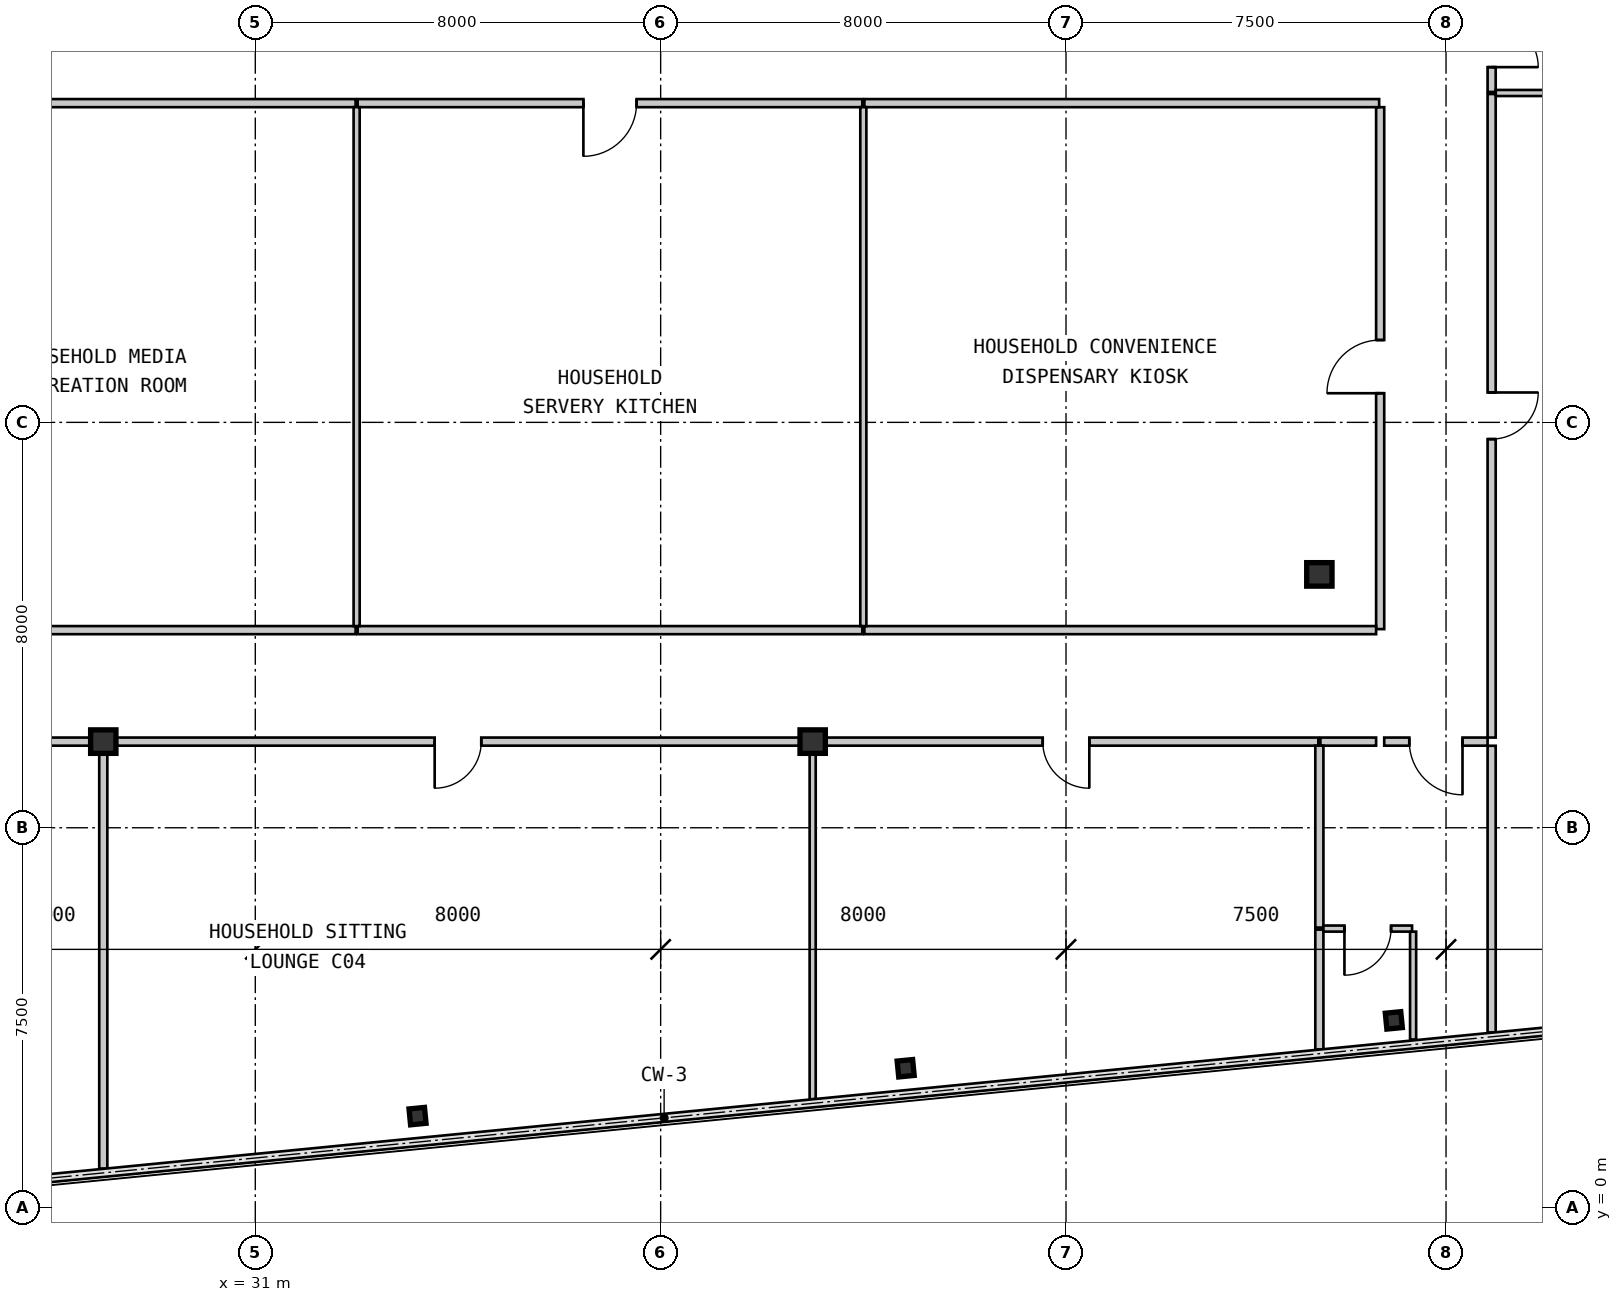
"""IFC4 building model, lengths in metres.
Left out: names, types, materials, properties, quantities, classifications, styles, units other than length and angle.
Written with IfcOpenShell. Run it as: python <this file> out.ifc"""

import sys

from ifc_helpers import new_model, si_unit, direction, frame, frame_2d, origin, origin_2d, place, context, subcontext, project, spatial, rectangle, i_section, extrude, source, transform, mapped, element, fill, save


model = new_model("IFC4")
c1 = context("Model", 3, precision=1e-05, world=origin(), true_north=direction((0.0, 1.0)))
c2 = subcontext(c1, "Body", "Model", "MODEL_VIEW")
j1 = project(units=[si_unit("LENGTHUNIT", "METRE"), si_unit("PLANEANGLEUNIT", "RADIAN")], contexts=[c1])
p1 = place(None, origin())
s1 = spatial("IfcSite", under=j1, at=p1, CompositionType="ELEMENT")
p2 = place(p1, origin())
s2 = spatial("IfcBuilding", under=s1, at=p2, CompositionType="ELEMENT")
p3 = place(p2, frame((0.0, 0.0, 80.85)))
s3 = spatial("IfcBuildingStorey", under=s2, at=p3, CompositionType="ELEMENT", Elevation=80.85)
m1 = source(origin(), c2, "Body", "SweptSolid", [
    extrude(i_section(OverallWidth=0.5, OverallDepth=0.464, WebThickness=0.022, FlangeThickness=0.034, at=origin_2d()), origin(), (0.0, 0.0, 1.0), 3.15),
])
for number, where, z_axis, x_axis in (
    (1, (28.0, 9.2, 0.0), (0.0, 0.0, 1.0), (1.0, 0.0, 0.0)),
    (2, (42.0, 9.2, 0.0), (0.0, 0.0, 1.0), (1.0, 0.0, 0.0)),
    (3, (52.0, 12.5, 0.0), (0.0, 0.0, 1.0), (1.0, 0.0, 0.0)),
):
    element("IfcColumn", number, at=place(p3, frame(where, z_axis=z_axis, x_axis=x_axis)), inside=s3, PredefinedType="COLUMN", context=c2, shape_type="MappedRepresentation", body=[
        mapped(m1, transform((0.0, 0.0, 0.0), scale=1.0)),
    ])
m2 = source(origin(), c2, "Body", "SweptSolid", [
    extrude(i_section(OverallWidth=0.307, OverallDepth=0.315, WebThickness=0.012, FlangeThickness=0.019, at=origin_2d()), origin(), (0.0, 0.0, 1.0), 3.15),
])
for number, where, z_axis, x_axis in (
    (4, (34.202, 1.809, 0.0), (0.0, 0.0, 1.0), (0.995, 0.098, 0.0)),
    (5, (43.835, 2.754, 0.0), (0.0, 0.0, 1.0), (0.995, 0.098, 0.0)),
    (6, (53.469, 3.698, 0.0), (0.0, 0.0, 1.0), (0.995, 0.098, 0.0)),
):
    element("IfcColumn", number, at=place(p3, frame(where, z_axis=z_axis, x_axis=x_axis)), inside=s3, PredefinedType="COLUMN", context=c2, shape_type="MappedRepresentation", body=[
        mapped(m2, transform((0.0, 0.0, 0.0), scale=1.0)),
    ])
m3 = source(origin(), c2, "Body", "SweptSolid", [
    extrude(rectangle(XDim=16.159, YDim=0.16, at=frame_2d((8.08, 0.0))), origin(), (0.0, 0.0, 1.0), 2.93),
])
p4 = place(p3, frame((32.98, 21.8, 0.0), z_axis=(0.0, 0.0, 1.0), x_axis=(-1.0, 0.0, 0.0)))
e7 = element("IfcWall", 7, at=p4, inside=s3, PredefinedType="PARTITIONING", context=c2, shape_type="MappedRepresentation", body=[
    mapped(m3, transform((0.0, 0.0, 0.0), scale=1.0)),
])
m4 = source(origin(), c2, "Body", "SweptSolid", [
    extrude(rectangle(XDim=0.92, YDim=2.1, at=frame_2d((0.46, 1.05))), frame((0.0, 0.09, 0.0), z_axis=(0.0, -1.0, 0.0), x_axis=(1.0, 0.0, 0.0)), (0.0, 0.0, 1.0), 0.18),
])
p5 = place(p4, frame((7.62, 0.0, 0.0)))
e8 = element("IfcOpeningElement", 8, at=p5, cuts=e7, PredefinedType="OPENING", context=c2, shape_type="MappedRepresentation", body=[
    mapped(m4, transform((0.0, 0.0, 0.0), scale=1.0)),
])
m5 = source(origin(), c2, "Body", "SweptSolid", [
    extrude(rectangle(XDim=9.959, YDim=0.16, at=frame_2d((4.98, 0.0))), origin(), (0.0, 0.0, 1.0), 2.93),
])
p6 = place(p3, frame((42.98, 21.8, 0.0), z_axis=(0.0, 0.0, 1.0), x_axis=(-1.0, 0.0, 0.0)))
e9 = element("IfcWall", 9, at=p6, inside=s3, PredefinedType="PARTITIONING", context=c2, shape_type="MappedRepresentation", body=[
    mapped(m5, transform((0.0, 0.0, 0.0), scale=1.0)),
])
m6 = source(origin(), c2, "Body", "SweptSolid", [
    extrude(rectangle(XDim=1.05, YDim=2.1, at=frame_2d((0.525, 1.05))), frame((0.0, 0.09, 0.0), z_axis=(0.0, -1.0, 0.0), x_axis=(1.0, 0.0, 0.0)), (0.0, 0.0, 1.0), 0.18),
])
p7 = place(p6, frame((4.455, 0.0, 0.0)))
e10 = element("IfcOpeningElement", 10, at=p7, cuts=e9, PredefinedType="OPENING", context=c2, shape_type="MappedRepresentation", body=[
    mapped(m6, transform((0.0, 0.0, 0.0), scale=1.0)),
])
m7 = source(origin(), c2, "Body", "SweptSolid", [
    extrude(rectangle(XDim=10.3, YDim=0.16, at=frame_2d((5.15, 0.0))), origin(), (0.0, 0.0, 1.0), 2.93),
])
p8 = place(p3, frame((53.2, 11.42, 0.0), z_axis=(0.0, 0.0, 1.0), x_axis=(0.0, 1.0, 0.0)))
e11 = element("IfcWall", 11, at=p8, inside=s3, PredefinedType="PARTITIONING", context=c2, shape_type="MappedRepresentation", body=[
    mapped(m7, transform((0.0, 0.0, 0.0), scale=1.0)),
])
p9 = place(p8, frame((4.655, 0.0, 0.0)))
e12 = element("IfcOpeningElement", 12, at=p9, cuts=e11, PredefinedType="OPENING", context=c2, shape_type="MappedRepresentation", body=[
    mapped(m6, transform((0.0, 0.0, 0.0), scale=1.0)),
])
m8 = source(origin(), c2, "Body", "SweptSolid", [
    extrude(rectangle(XDim=10.159, YDim=0.16, at=frame_2d((5.08, 0.0))), origin(), (0.0, 0.0, 1.0), 2.93),
])
p10 = place(p3, frame((53.18, 21.8, 0.0), z_axis=(0.0, 0.0, 1.0), x_axis=(-1.0, 0.0, 0.0)))
e13 = element("IfcWall", 13, at=p10, inside=s3, PredefinedType="PARTITIONING", context=c2, shape_type="MappedRepresentation", body=[
    mapped(m8, transform((0.0, 0.0, 0.0), scale=1.0)),
])
m9 = source(origin(), c2, "Body", "SweptSolid", [
    extrude(rectangle(XDim=2.04, YDim=0.16, at=frame_2d((1.02, 0.0))), origin(), (0.0, 0.0, 1.0), 2.93),
])
p11 = place(p3, frame((55.32, 9.2, 0.0), z_axis=(0.0, 0.0, 1.0), x_axis=(-1.0, 0.0, 0.0)))
e14 = element("IfcWall", 14, at=p11, inside=s3, PredefinedType="PARTITIONING", context=c2, shape_type="MappedRepresentation", body=[
    mapped(m9, transform((0.0, 0.0, 0.0), scale=1.0)),
])
p12 = place(p11, frame((0.495, 0.0, 0.0)))
e15 = element("IfcOpeningElement", 15, at=p12, cuts=e14, PredefinedType="OPENING", context=c2, shape_type="MappedRepresentation", body=[
    mapped(m6, transform((0.0, 0.0, 0.0), scale=1.0)),
])
m10 = source(origin(), c2, "Body", "SweptSolid", [
    extrude(rectangle(XDim=12.7, YDim=0.16, at=frame_2d((6.35, 0.0))), origin(), (0.0, 0.0, 1.0), 2.93),
])
p13 = place(p3, frame((55.4, 21.98, 0.0), z_axis=(0.0, 0.0, 1.0), x_axis=(0.0, -1.0, 0.0)))
e16 = element("IfcWall", 16, at=p13, inside=s3, PredefinedType="PARTITIONING", context=c2, shape_type="MappedRepresentation", body=[
    mapped(m10, transform((0.0, 0.0, 0.0), scale=1.0)),
])
p14 = place(p13, frame((5.89, 0.0, 0.0)))
e17 = element("IfcOpeningElement", 17, at=p14, cuts=e16, PredefinedType="OPENING", context=c2, shape_type="MappedRepresentation", body=[
    mapped(m4, transform((0.0, 0.0, 0.0), scale=1.0)),
])
m11 = source(origin(), c2, "Body", "SweptSolid", [
    extrude(rectangle(XDim=1.9, YDim=0.16, at=frame_2d((0.95, 0.0))), origin(), (0.0, 0.0, 1.0), 2.93),
])
p15 = place(p3, frame((55.4, 23.92, 0.0), z_axis=(0.0, 0.0, 1.0), x_axis=(0.0, -1.0, 0.0)))
e18 = element("IfcWall", 18, at=p15, inside=s3, PredefinedType="PARTITIONING", context=c2, shape_type="MappedRepresentation", body=[
    mapped(m11, transform((0.0, 0.0, 0.0), scale=1.0)),
])
p16 = place(p15, frame((0.49, 0.0, 0.0)))
e19 = element("IfcOpeningElement", 19, at=p16, cuts=e18, PredefinedType="OPENING", context=c2, shape_type="MappedRepresentation", body=[
    mapped(m4, transform((0.0, 0.0, 0.0), scale=1.0)),
])
m12 = source(origin(), c2, "Body", "SweptSolid", [
    extrude(rectangle(XDim=16.1, YDim=0.16, at=frame_2d((8.05, 0.0))), origin(), (0.0, 0.0, 1.0), 2.93),
])
p17 = place(p3, frame((16.88, 11.4, 0.0), z_axis=(0.0, 0.0, 1.0), x_axis=(1.0, 0.0, 0.0)))
e20 = element("IfcWall", 20, at=p17, inside=s3, PredefinedType="PARTITIONING", context=c2, shape_type="MappedRepresentation", body=[
    mapped(m12, transform((0.0, 0.0, 0.0), scale=1.0)),
])
p18 = place(p3, frame((33.02, 11.4, 0.0), z_axis=(0.0, 0.0, 1.0), x_axis=(1.0, 0.0, 0.0)))
e21 = element("IfcWall", 21, at=p18, inside=s3, PredefinedType="PARTITIONING", context=c2, shape_type="MappedRepresentation", body=[
    mapped(m5, transform((0.0, 0.0, 0.0), scale=1.0)),
])
m13 = source(origin(), c2, "Body", "SweptSolid", [
    extrude(rectangle(XDim=10.1, YDim=0.16, at=frame_2d((5.05, 0.0))), origin(), (0.0, 0.0, 1.0), 2.93),
])
p19 = place(p3, frame((43.02, 11.4, 0.0), z_axis=(0.0, 0.0, 1.0), x_axis=(1.0, 0.0, 0.0)))
e22 = element("IfcWall", 22, at=p19, inside=s3, PredefinedType="PARTITIONING", context=c2, shape_type="MappedRepresentation", body=[
    mapped(m13, transform((0.0, 0.0, 0.0), scale=1.0)),
])
m14 = source(origin(), c2, "Body", "SweptSolid", [
    extrude(rectangle(XDim=3.76, YDim=0.16, at=frame_2d((1.88, 0.0))), origin(), (0.0, 0.0, 1.0), 2.93),
])
p20 = place(p3, frame((27.98, 9.2, 0.0), z_axis=(0.0, 0.0, 1.0), x_axis=(-1.0, 0.0, 0.0)))
e23 = element("IfcWall", 23, at=p20, inside=s3, PredefinedType="PARTITIONING", context=c2, shape_type="MappedRepresentation", body=[
    mapped(m14, transform((0.0, 0.0, 0.0), scale=1.0)),
])
p21 = place(p20, frame((1.355, 0.0, 0.0)))
e24 = element("IfcOpeningElement", 24, at=p21, cuts=e23, PredefinedType="OPENING", context=c2, shape_type="MappedRepresentation", body=[
    mapped(m6, transform((0.0, 0.0, 0.0), scale=1.0)),
])
m15 = source(origin(), c2, "Body", "SweptSolid", [
    extrude(rectangle(XDim=13.959, YDim=0.16, at=frame_2d((6.98, 0.0))), origin(), (0.0, 0.0, 1.0), 2.328),
])
p22 = place(p3, frame((41.98, 9.2, 0.0), z_axis=(0.0, 0.0, 1.0), x_axis=(-1.0, 0.0, 0.0)))
e25 = element("IfcWall", 25, at=p22, inside=s3, PredefinedType="PARTITIONING", context=c2, shape_type="MappedRepresentation", body=[
    mapped(m15, transform((0.0, 0.0, 0.0), scale=1.0)),
])
p23 = place(p22, frame((6.52, 0.0, 0.0)))
e26 = element("IfcOpeningElement", 26, at=p23, cuts=e25, PredefinedType="OPENING", context=c2, shape_type="MappedRepresentation", body=[
    mapped(m4, transform((0.0, 0.0, 0.0), scale=1.0)),
])
p24 = place(p3, frame((51.98, 9.2, 0.0), z_axis=(0.0, 0.0, 1.0), x_axis=(-1.0, 0.0, 0.0)))
e27 = element("IfcWall", 27, at=p24, inside=s3, PredefinedType="PARTITIONING", context=c2, shape_type="MappedRepresentation", body=[
    mapped(m5, transform((0.0, 0.0, 0.0), scale=1.0)),
])
p25 = place(p24, frame((4.52, 0.0, 0.0)))
e28 = element("IfcOpeningElement", 28, at=p25, cuts=e27, PredefinedType="OPENING", context=c2, shape_type="MappedRepresentation", body=[
    mapped(m4, transform((0.0, 0.0, 0.0), scale=1.0)),
])
m16 = source(origin(), c2, "Body", "SweptSolid", [
    extrude(rectangle(XDim=1.1, YDim=0.16, at=frame_2d((0.55, 0.0))), origin(), (0.0, 0.0, 1.0), 2.93),
])
p26 = place(p3, frame((53.12, 9.2, 0.0), z_axis=(0.0, 0.0, 1.0), x_axis=(-1.0, 0.0, 0.0)))
e29 = element("IfcWall", 29, at=p26, inside=s3, PredefinedType="PARTITIONING", context=c2, shape_type="MappedRepresentation", body=[
    mapped(m16, transform((0.0, 0.0, 0.0), scale=1.0)),
])
m17 = source(origin(), c2, "Body", "SweptSolid", [
    extrude(rectangle(XDim=10.24, YDim=0.12, at=frame_2d((5.12, 0.0))), origin(), (0.0, 0.0, 1.0), 2.93),
])
for number, where, z_axis, x_axis in (
    (30, (33.0, 21.72, 0.0), (0.0, 0.0, 1.0), (0.0, -1.0, 0.0)),
    (31, (43.0, 21.72, 0.0), (0.0, 0.0, 1.0), (0.0, -1.0, 0.0)),
):
    element("IfcWall", number, at=place(p3, frame(where, z_axis=z_axis, x_axis=x_axis)), inside=s3, PredefinedType="PARTITIONING", context=c2, shape_type="MappedRepresentation", body=[
        mapped(m17, transform((0.0, 0.0, 0.0), scale=1.0)),
    ])
m18 = source(origin(), c2, "Body", "SweptSolid", [
    extrude(rectangle(XDim=8.345, YDim=0.16, at=frame_2d((4.172, 0.0))), origin(), (0.0, 0.0, 1.0), 2.93),
])
p27 = place(p3, frame((28.0, 9.118, 0.0), z_axis=(0.0, 0.0, 1.0), x_axis=(0.0, -1.0, 0.0)))
e32 = element("IfcWall", 32, at=p27, inside=s3, PredefinedType="PARTITIONING", context=c2, shape_type="MappedRepresentation", body=[
    mapped(m18, transform((0.0, 0.0, 0.0), scale=1.0)),
])
m19 = source(origin(), c2, "Body", "SweptSolid", [
    extrude(rectangle(XDim=6.976, YDim=0.12, at=frame_2d((3.488, 0.0))), origin(), (0.0, 0.0, 1.0), 2.93),
])
p28 = place(p3, frame((42.0, 9.12, 0.0), z_axis=(0.0, 0.0, 1.0), x_axis=(0.0, -1.0, 0.0)))
e33 = element("IfcWall", 33, at=p28, inside=s3, PredefinedType="PARTITIONING", context=c2, shape_type="MappedRepresentation", body=[
    mapped(m19, transform((0.0, 0.0, 0.0), scale=1.0)),
])
m20 = source(origin(), c2, "Body", "SweptSolid", [
    extrude(rectangle(XDim=3.59, YDim=0.16, at=frame_2d((1.795, 0.0))), origin(), (0.0, 0.0, 1.0), 2.93),
])
p29 = place(p3, frame((52.0, 9.12, 0.0), z_axis=(0.0, 0.0, 1.0), x_axis=(0.0, -1.0, 0.0)))
e34 = element("IfcWall", 34, at=p29, inside=s3, PredefinedType="PARTITIONING", context=c2, shape_type="MappedRepresentation", body=[
    mapped(m20, transform((0.0, 0.0, 0.0), scale=1.0)),
])
m21 = source(origin(), c2, "Body", "SweptSolid", [
    extrude(rectangle(XDim=2.365, YDim=0.16, at=frame_2d((1.183, 0.0))), origin(), (0.0, 0.0, 1.0), 2.93),
])
p30 = place(p3, frame((52.0, 5.49, 0.0), z_axis=(0.0, 0.0, 1.0), x_axis=(0.0, -1.0, 0.0)))
e35 = element("IfcWall", 35, at=p30, inside=s3, PredefinedType="PARTITIONING", context=c2, shape_type="MappedRepresentation", body=[
    mapped(m21, transform((0.0, 0.0, 0.0), scale=1.0)),
])
m22 = source(origin(), c2, "Body", "SweptSolid", [
    extrude(rectangle(XDim=2.128, YDim=0.12, at=frame_2d((1.064, 0.0))), origin(), (0.0, 0.0, 1.0), 2.93),
])
p31 = place(p3, frame((53.85, 3.322, 0.0), z_axis=(0.0, 0.0, 1.0), x_axis=(0.0, 1.0, 0.0)))
e36 = element("IfcWall", 36, at=p31, inside=s3, PredefinedType="PARTITIONING", context=c2, shape_type="MappedRepresentation", body=[
    mapped(m22, transform((0.0, 0.0, 0.0), scale=1.0)),
])
m23 = source(origin(), c2, "Body", "SweptSolid", [
    extrude(rectangle(XDim=1.75, YDim=0.12, at=frame_2d((0.875, 0.0))), origin(), (0.0, 0.0, 1.0), 2.93),
])
p32 = place(p3, frame((53.83, 5.51, 0.0), z_axis=(0.0, 0.0, 1.0), x_axis=(-1.0, 0.0, 0.0)))
e37 = element("IfcWall", 37, at=p32, inside=s3, PredefinedType="PARTITIONING", context=c2, shape_type="MappedRepresentation", body=[
    mapped(m23, transform((0.0, 0.0, 0.0), scale=1.0)),
])
m24 = source(origin(), c2, "Body", "SweptSolid", [
    extrude(rectangle(XDim=0.92, YDim=2.1, at=frame_2d((0.46, 1.05))), frame((0.0, 0.07, 0.0), z_axis=(0.0, -1.0, 0.0), x_axis=(1.0, 0.0, 0.0)), (0.0, 0.0, 1.0), 0.14),
])
p33 = place(p32, frame((0.415, 0.0, 0.0)))
e38 = element("IfcOpeningElement", 38, at=p33, cuts=e37, PredefinedType="OPENING", context=c2, shape_type="MappedRepresentation", body=[
    mapped(m24, transform((0.0, 0.0, 0.0), scale=1.0)),
])
m25 = source(origin(), c2, "Body", "SweptSolid", [
    extrude(rectangle(XDim=5.658, YDim=0.16, at=frame_2d((2.829, 0.0))), origin(), (0.0, 0.0, 1.0), 2.93),
])
p34 = place(p3, frame((55.4, 9.118, 0.0), z_axis=(0.0, 0.0, 1.0), x_axis=(0.0, -1.0, 0.0)))
e39 = element("IfcWall", 39, at=p34, inside=s3, PredefinedType="PARTITIONING", context=c2, shape_type="MappedRepresentation", body=[
    mapped(m25, transform((0.0, 0.0, 0.0), scale=1.0)),
])
m26 = source(origin(), c2, "Body", "SweptSolid", [
    extrude(rectangle(XDim=7.709, YDim=0.12, at=frame_2d((3.854, 0.0))), origin(), (0.0, 0.0, 1.0), 2.93),
])
p35 = place(p3, frame((55.482, 22.0, 0.0), z_axis=(0.0, 0.0, 1.0), x_axis=(1.0, 0.0, 0.0)))
e40 = element("IfcWall", 40, at=p35, inside=s3, PredefinedType="PARTITIONING", context=c2, shape_type="MappedRepresentation", body=[
    mapped(m26, transform((0.0, 0.0, 0.0), scale=1.0)),
])
m27 = source(origin(), c2, "Body", "SweptSolid", [
    extrude(rectangle(XDim=1.05, YDim=2.1, at=frame_2d((0.525, 1.05))), frame((0.0, 0.025, 0.0), z_axis=(0.0, -1.0, 0.0), x_axis=(1.0, 0.0, 0.0)), (0.0, 0.0, 1.0), 0.05),
])
p36 = place(p7, origin())
e41 = element("IfcDoor", 41, at=p36, inside=s3, OperationType="SINGLE_SWING_RIGHT", PredefinedType="DOOR", context=c2, shape_type="MappedRepresentation", body=[
    mapped(m27, transform((0.0, 0.0, 0.0), scale=1.0)),
])
fill(e10, e41)
p37 = place(p9, origin())
e42 = element("IfcDoor", 42, at=p37, inside=s3, OperationType="SINGLE_SWING_LEFT", PredefinedType="DOOR", context=c2, shape_type="MappedRepresentation", body=[
    mapped(m27, transform((0.0, 0.0, 0.0), scale=1.0)),
])
fill(e12, e42)
p38 = place(p12, origin())
e43 = element("IfcDoor", 43, at=p38, inside=s3, OperationType="SINGLE_SWING_LEFT", PredefinedType="DOOR", context=c2, shape_type="MappedRepresentation", body=[
    mapped(m27, transform((0.0, 0.0, 0.0), scale=1.0)),
])
fill(e15, e43)
m28 = source(origin(), c2, "Body", "SweptSolid", [
    extrude(rectangle(XDim=0.92, YDim=2.1, at=frame_2d((0.46, 1.05))), frame((0.0, 0.025, 0.0), z_axis=(0.0, -1.0, 0.0), x_axis=(1.0, 0.0, 0.0)), (0.0, 0.0, 1.0), 0.05),
])
p39 = place(p14, origin())
e44 = element("IfcDoor", 44, at=p39, inside=s3, OperationType="SINGLE_SWING_LEFT", PredefinedType="DOOR", context=c2, shape_type="MappedRepresentation", body=[
    mapped(m28, transform((0.0, 0.0, 0.0), scale=1.0)),
])
fill(e17, e44)
p40 = place(p16, origin())
e45 = element("IfcDoor", 45, at=p40, inside=s3, OperationType="SINGLE_SWING_RIGHT", PredefinedType="DOOR", context=c2, shape_type="MappedRepresentation", body=[
    mapped(m28, transform((0.0, 0.0, 0.0), scale=1.0)),
])
fill(e19, e45)
p41 = place(p23, origin())
e46 = element("IfcDoor", 46, at=p41, inside=s3, OperationType="SINGLE_SWING_RIGHT", PredefinedType="DOOR", context=c2, shape_type="MappedRepresentation", body=[
    mapped(m28, transform((0.0, 0.0, 0.0), scale=1.0)),
])
fill(e26, e46)
p42 = place(p25, origin())
e47 = element("IfcDoor", 47, at=p42, inside=s3, OperationType="SINGLE_SWING_LEFT", PredefinedType="DOOR", context=c2, shape_type="MappedRepresentation", body=[
    mapped(m28, transform((0.0, 0.0, 0.0), scale=1.0)),
])
fill(e28, e47)
p43 = place(p33, origin())
e48 = element("IfcDoor", 48, at=p43, inside=s3, OperationType="SINGLE_SWING_RIGHT", PredefinedType="DOOR", context=c2, shape_type="MappedRepresentation", body=[
    mapped(m28, transform((0.0, 0.0, 0.0), scale=1.0)),
])
fill(e38, e48)
save(model, sys.argv[1])
